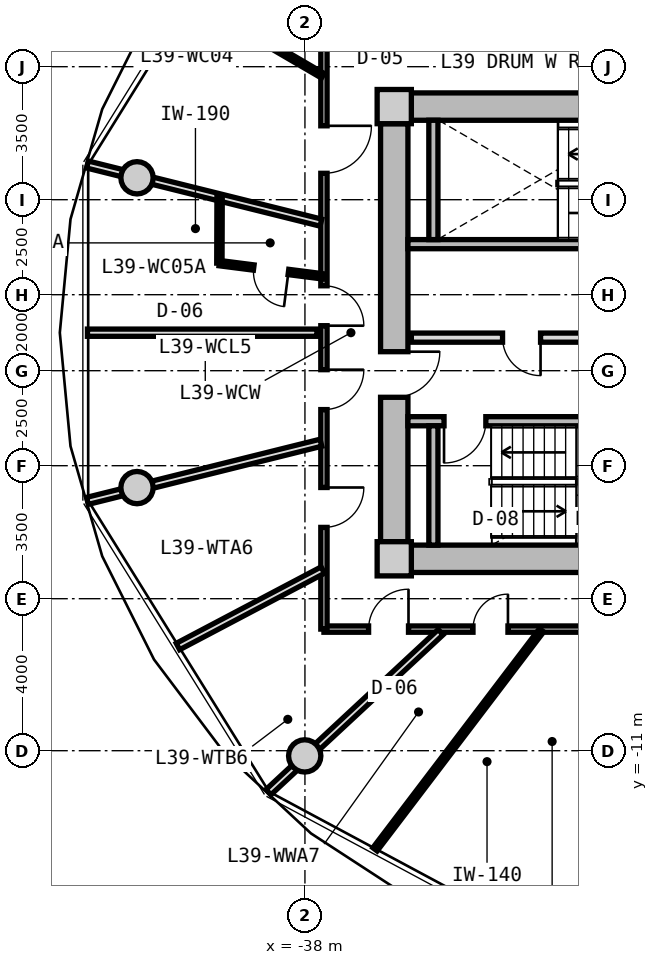
"""IFC4 building model, lengths in metres.
Left out: names, types, materials, properties, quantities, classifications, styles, units other than length and angle.
Written with IfcOpenShell. Run it as: python <this file> out.ifc"""

import sys

from ifc_helpers import new_model, si_unit, direction, frame, frame_2d, origin, origin_2d, place, context, subcontext, project, spatial, rectangle, circle, extrude, source, transform, mapped, element, fill, save


model = new_model("IFC4")
c1 = context("Model", 3, precision=1e-05, world=origin(), true_north=direction((0.0, 1.0)))
c2 = subcontext(c1, "Body", "Model", "MODEL_VIEW")
j1 = project(units=[si_unit("LENGTHUNIT", "METRE"), si_unit("PLANEANGLEUNIT", "RADIAN")], contexts=[c1])
p1 = place(None, origin())
s1 = spatial("IfcSite", under=j1, at=p1, CompositionType="ELEMENT")
p2 = place(p1, origin())
s2 = spatial("IfcBuilding", under=s1, at=p2, CompositionType="ELEMENT")
p3 = place(p2, frame((0.0, 0.0, 126.75)))
s3 = spatial("IfcBuildingStorey", under=s2, at=p3, CompositionType="ELEMENT", Elevation=126.75)
m1 = source(origin(), c2, "Body", "SweptSolid", [
    extrude(rectangle(XDim=0.9, YDim=0.9, at=origin_2d()), origin(), (0.0, 0.0, 1.0), 3.05),
])
for number, where, z_axis, x_axis in (
    (1, (-35.65, -5.95, 0.0), (0.0, 0.0, 1.0), (1.0, 0.0, 0.0)),
    (2, (-35.65, 5.95, 0.0), (0.0, 0.0, 1.0), (1.0, 0.0, 0.0)),
):
    element("IfcColumn", number, at=place(p3, frame(where, z_axis=z_axis, x_axis=x_axis)), inside=s3, PredefinedType="COLUMN", context=c2, shape_type="MappedRepresentation", body=[
        mapped(m1, transform((0.0, 0.0, 0.0), x_axis=(1.0, 0.0, 0.0), y_axis=(0.0, 1.0, 0.0), z_axis=(0.0, 0.0, 1.0), scale=1.0)),
    ])
m2 = source(origin(), c2, "Body", "SweptSolid", [
    extrude(rectangle(XDim=14.4, YDim=0.72, at=frame_2d((7.2, 0.0))), origin(), (0.0, 0.0, 1.0), 2.73),
])
for number, where, z_axis, x_axis in (
    (3, (-35.2, 5.95, 0.0), (0.0, 0.0, 1.0), (1.0, 0.0, 0.0)),
    (4, (-20.8, -5.95, 0.0), (0.0, 0.0, 1.0), (-1.0, 0.0, 0.0)),
):
    element("IfcWall", number, at=place(p3, frame(where, z_axis=z_axis, x_axis=x_axis)), inside=s3, PredefinedType="SHEAR", context=c2, shape_type="MappedRepresentation", body=[
        mapped(m2, transform((0.0, 0.0, 0.0), x_axis=(1.0, 0.0, 0.0), y_axis=(0.0, 1.0, 0.0), z_axis=(0.0, 0.0, 1.0), scale=1.0)),
    ])
m3 = source(origin(), c2, "Body", "SweptSolid", [
    extrude(rectangle(XDim=11.0, YDim=0.72, at=frame_2d((5.5, 0.0))), origin(), (0.0, 0.0, 1.0), 2.73),
])
p4 = place(p3, frame((-35.65, -5.5, 0.0), z_axis=(0.0, 0.0, 1.0), x_axis=(0.0, 1.0, 0.0)))
e5 = element("IfcWall", 5, at=p4, inside=s3, PredefinedType="SHEAR", context=c2, shape_type="MappedRepresentation", body=[
    mapped(m3, transform((0.0, 0.0, 0.0), x_axis=(1.0, 0.0, 0.0), y_axis=(0.0, 1.0, 0.0), z_axis=(0.0, 0.0, 1.0), scale=1.0)),
])
p5 = place(p4, frame((3.8, 0.0, 0.0)))
e6 = element("IfcOpeningElement", 6, at=p5, cuts=e5, PredefinedType="OPENING", context=c2, shape_type="SweptSolid", body=[
    extrude(rectangle(XDim=1.2, YDim=2.15, at=frame_2d((0.6, 1.075))), frame((0.0, 0.37, 0.0), z_axis=(0.0, -1.0, 0.0), x_axis=(1.0, 0.0, 0.0)), (0.0, 0.0, 1.0), 0.74),
])
m4 = source(origin(), c2, "Body", "SweptSolid", [
    extrude(circle(Radius=0.425, at=origin_2d()), origin(), (0.0, 0.0, 1.0), 3.05),
])
for number, where, z_axis, x_axis in (
    (7, (-42.419, 4.076, 0.0), (0.0, 0.0, 1.0), (1.0, 0.0, 0.0)),
    (8, (-42.419, -4.076, 0.0), (0.0, 0.0, 1.0), (1.0, 0.0, 0.0)),
    (9, (-38.006, -11.137, 0.0), (0.0, 0.0, 1.0), (1.0, 0.0, 0.0)),
):
    element("IfcColumn", number, at=place(p3, frame(where, z_axis=z_axis, x_axis=x_axis)), inside=s3, PredefinedType="COLUMN", context=c2, shape_type="MappedRepresentation", body=[
        mapped(m4, transform((0.0, 0.0, 0.0), x_axis=(1.0, 0.0, 0.0), y_axis=(0.0, 1.0, 0.0), z_axis=(0.0, 0.0, 1.0), scale=1.0)),
    ])
m5 = source(origin(), c2, "Body", "SweptSolid", [
    extrude(rectangle(XDim=7.83, YDim=0.24, at=frame_2d((3.915, 0.0))), origin(), (0.0, 0.0, 1.0), 2.73),
])
p6 = place(p3, frame((-35.29, 2.33, 0.0), z_axis=(0.0, 0.0, 1.0), x_axis=(1.0, 0.0, 0.0)))
e10 = element("IfcWall", 10, at=p6, inside=s3, PredefinedType="PARTITIONING", context=c2, shape_type="MappedRepresentation", body=[
    mapped(m5, transform((0.0, 0.0, 0.0), x_axis=(1.0, 0.0, 0.0), y_axis=(0.0, 1.0, 0.0), z_axis=(0.0, 0.0, 1.0), scale=1.0)),
])
m6 = source(origin(), c2, "Body", "SweptSolid", [
    extrude(rectangle(XDim=3.14, YDim=0.24, at=frame_2d((1.57, 0.0))), origin(), (0.0, 0.0, 1.0), 2.73),
])
p7 = place(p3, frame((-34.62, 2.45, 0.0), z_axis=(0.0, 0.0, 1.0), x_axis=(0.0, 1.0, 0.0)))
e11 = element("IfcWall", 11, at=p7, inside=s3, PredefinedType="PARTITIONING", context=c2, shape_type="MappedRepresentation", body=[
    mapped(m6, transform((0.0, 0.0, 0.0), x_axis=(1.0, 0.0, 0.0), y_axis=(0.0, 1.0, 0.0), z_axis=(0.0, 0.0, 1.0), scale=1.0)),
])
p8 = place(p3, frame((-35.29, -2.33, 0.0), z_axis=(0.0, 0.0, 1.0), x_axis=(1.0, 0.0, 0.0)))
e12 = element("IfcWall", 12, at=p8, inside=s3, PredefinedType="PARTITIONING", context=c2, shape_type="MappedRepresentation", body=[
    mapped(m5, transform((0.0, 0.0, 0.0), x_axis=(1.0, 0.0, 0.0), y_axis=(0.0, 1.0, 0.0), z_axis=(0.0, 0.0, 1.0), scale=1.0)),
])
p9 = place(p8, frame((0.95, 0.0, 0.0)))
e13 = element("IfcOpeningElement", 13, at=p9, cuts=e12, PredefinedType="OPENING", context=c2, shape_type="SweptSolid", body=[
    extrude(rectangle(XDim=1.1, YDim=2.15, at=frame_2d((0.55, 1.075))), frame((0.0, 0.13, 0.0), z_axis=(0.0, -1.0, 0.0), x_axis=(1.0, 0.0, 0.0)), (0.0, 0.0, 1.0), 0.26),
])
p10 = place(p3, frame((-34.62, -5.59, 0.0), z_axis=(0.0, 0.0, 1.0), x_axis=(0.0, 1.0, 0.0)))
e14 = element("IfcWall", 14, at=p10, inside=s3, PredefinedType="PARTITIONING", context=c2, shape_type="MappedRepresentation", body=[
    mapped(m6, transform((0.0, 0.0, 0.0), x_axis=(1.0, 0.0, 0.0), y_axis=(0.0, 1.0, 0.0), z_axis=(0.0, 0.0, 1.0), scale=1.0)),
])
m7 = source(origin(), c2, "Body", "SweptSolid", [
    extrude(rectangle(XDim=7.62, YDim=0.24, at=frame_2d((3.81, 0.0))), origin(), (0.0, 0.0, 1.0), 2.715),
])
p11 = place(p3, frame((-35.2, -0.13, 0.0), z_axis=(0.0, 0.0, 1.0), x_axis=(1.0, 0.0, 0.0)))
e15 = element("IfcWall", 15, at=p11, inside=s3, PredefinedType="PARTITIONING", context=c2, shape_type="MappedRepresentation", body=[
    mapped(m7, transform((0.0, 0.0, 0.0), x_axis=(1.0, 0.0, 0.0), y_axis=(0.0, 1.0, 0.0), z_axis=(0.0, 0.0, 1.0), scale=1.0)),
])
p12 = place(p11, frame((6.22, 0.0, 0.0)))
e16 = element("IfcOpeningElement", 16, at=p12, cuts=e15, PredefinedType="OPENING", context=c2, shape_type="SweptSolid", body=[
    extrude(rectangle(XDim=1.0, YDim=2.1, at=frame_2d((0.5, 1.05))), frame((0.0, 0.13, 0.0), z_axis=(0.0, -1.0, 0.0), x_axis=(1.0, 0.0, 0.0)), (0.0, 0.0, 1.0), 0.26),
])
p13 = place(p11, frame((2.4, 0.0, 0.0)))
e17 = element("IfcOpeningElement", 17, at=p13, cuts=e15, PredefinedType="OPENING", context=c2, shape_type="SweptSolid", body=[
    extrude(rectangle(XDim=1.0, YDim=2.1, at=frame_2d((0.5, 1.05))), frame((0.0, 0.13, 0.0), z_axis=(0.0, -1.0, 0.0), x_axis=(1.0, 0.0, 0.0)), (0.0, 0.0, 1.0), 0.26),
])
m8 = source(origin(), c2, "Body", "SweptSolid", [
    extrude(rectangle(XDim=9.234, YDim=0.165, at=frame_2d((4.617, 0.0))), origin(), (0.0, 0.0, 1.0), 2.715),
])
p14 = place(p3, frame((-28.266, -7.8, 0.0), z_axis=(0.0, 0.0, 1.0), x_axis=(-1.0, 0.0, 0.0)))
e18 = element("IfcWall", 18, at=p14, inside=s3, PredefinedType="PARTITIONING", context=c2, shape_type="MappedRepresentation", body=[
    mapped(m8, transform((0.0, 0.0, 0.0), x_axis=(1.0, 0.0, 0.0), y_axis=(0.0, 1.0, 0.0), z_axis=(0.0, 0.0, 1.0), scale=1.0)),
])
p15 = place(p14, frame((7.009, 0.0, 0.0)))
e19 = element("IfcOpeningElement", 19, at=p15, cuts=e18, PredefinedType="OPENING", context=c2, shape_type="SweptSolid", body=[
    extrude(rectangle(XDim=1.05, YDim=2.15, at=frame_2d((0.525, 1.075))), frame((0.0, 0.093, 0.0), z_axis=(0.0, -1.0, 0.0), x_axis=(1.0, 0.0, 0.0)), (0.0, 0.0, 1.0), 0.185),
])
p16 = place(p14, frame((4.392, 0.0, 0.0)))
e20 = element("IfcOpeningElement", 20, at=p16, cuts=e18, PredefinedType="OPENING", context=c2, shape_type="SweptSolid", body=[
    extrude(rectangle(XDim=0.92, YDim=2.1, at=frame_2d((0.46, 1.05))), frame((0.0, 0.093, 0.0), z_axis=(0.0, -1.0, 0.0), x_axis=(1.0, 0.0, 0.0)), (0.0, 0.0, 1.0), 0.185),
])
p17 = place(p14, frame((1.408, 0.0, 0.0)))
e21 = element("IfcOpeningElement", 21, at=p17, cuts=e18, PredefinedType="OPENING", context=c2, shape_type="SweptSolid", body=[
    extrude(rectangle(XDim=0.92, YDim=2.1, at=frame_2d((0.46, 1.05))), frame((0.0, 0.093, 0.0), z_axis=(0.0, -1.0, 0.0), x_axis=(1.0, 0.0, 0.0)), (0.0, 0.0, 1.0), 0.185),
])
m9 = source(origin(), c2, "Body", "SweptSolid", [
    extrude(rectangle(XDim=15.6, YDim=0.165, at=frame_2d((7.8, 0.0))), origin(), (0.0, 0.0, 1.0), 2.715),
])
p18 = place(p3, frame((-37.5, -7.8, 0.0), z_axis=(0.0, 0.0, 1.0), x_axis=(0.0, 1.0, 0.0)))
e22 = element("IfcWall", 22, at=p18, inside=s3, PredefinedType="PARTITIONING", context=c2, shape_type="MappedRepresentation", body=[
    mapped(m9, transform((0.0, 0.0, 0.0), x_axis=(1.0, 0.0, 0.0), y_axis=(0.0, 1.0, 0.0), z_axis=(0.0, 0.0, 1.0), scale=1.0)),
])
p19 = place(p18, frame((11.994, 0.0, 0.0)))
e23 = element("IfcOpeningElement", 23, at=p19, cuts=e22, PredefinedType="OPENING", context=c2, shape_type="SweptSolid", body=[
    extrude(rectangle(XDim=1.25, YDim=2.2, at=frame_2d((0.625, 1.1))), frame((0.0, 0.093, 0.0), z_axis=(0.0, -1.0, 0.0), x_axis=(1.0, 0.0, 0.0)), (0.0, 0.0, 1.0), 0.185),
])
p20 = place(p18, frame((7.984, 0.0, 0.0)))
e24 = element("IfcOpeningElement", 24, at=p20, cuts=e22, PredefinedType="OPENING", context=c2, shape_type="SweptSolid", body=[
    extrude(rectangle(XDim=1.05, YDim=2.15, at=frame_2d((0.525, 1.075))), frame((0.0, 0.093, 0.0), z_axis=(0.0, -1.0, 0.0), x_axis=(1.0, 0.0, 0.0)), (0.0, 0.0, 1.0), 0.185),
])
p21 = place(p18, frame((5.777, 0.0, 0.0)))
e25 = element("IfcOpeningElement", 25, at=p21, cuts=e22, PredefinedType="OPENING", context=c2, shape_type="SweptSolid", body=[
    extrude(rectangle(XDim=1.05, YDim=2.15, at=frame_2d((0.525, 1.075))), frame((0.0, 0.093, 0.0), z_axis=(0.0, -1.0, 0.0), x_axis=(1.0, 0.0, 0.0)), (0.0, 0.0, 1.0), 0.185),
])
p22 = place(p18, frame((2.676, 0.0, 0.0)))
e26 = element("IfcOpeningElement", 26, at=p22, cuts=e22, PredefinedType="OPENING", context=c2, shape_type="SweptSolid", body=[
    extrude(rectangle(XDim=1.05, YDim=2.15, at=frame_2d((0.525, 1.075))), frame((0.0, 0.093, 0.0), z_axis=(0.0, -1.0, 0.0), x_axis=(1.0, 0.0, 0.0)), (0.0, 0.0, 1.0), 0.185),
])
m10 = source(origin(), c2, "Body", "SweptSolid", [
    extrude(rectangle(XDim=6.331, YDim=0.19, at=frame_2d((3.165, 0.0))), origin(), (0.0, 0.0, 1.0), 2.215),
])
p23 = place(p3, frame((-37.58, 2.896, 0.0), z_axis=(0.0, 0.0, 1.0), x_axis=(-0.97036440661, 0.241646267062, 0.0)))
e27 = element("IfcWall", 27, at=p23, inside=s3, PredefinedType="PARTITIONING", context=c2, shape_type="MappedRepresentation", body=[
    mapped(m10, transform((0.0, 0.0, 0.0), x_axis=(1.0, 0.0, 0.0), y_axis=(0.0, 1.0, 0.0), z_axis=(0.0, 0.0, 1.0), scale=1.0)),
])
m11 = source(origin(), c2, "Body", "SweptSolid", [
    extrude(rectangle(XDim=2.172, YDim=0.14, at=frame_2d((1.086, 0.0))), origin(), (0.0, 0.0, 1.0), 2.715),
])
p24 = place(p3, frame((-37.53, 6.762, 0.0), z_axis=(0.0, 0.0, 1.0), x_axis=(-0.863562702562, 0.504241468688, 0.0)))
e28 = element("IfcWall", 28, at=p24, inside=s3, PredefinedType="PARTITIONING", context=c2, shape_type="MappedRepresentation", body=[
    mapped(m11, transform((0.0, 0.0, 0.0), x_axis=(1.0, 0.0, 0.0), y_axis=(0.0, 1.0, 0.0), z_axis=(0.0, 0.0, 1.0), scale=1.0)),
])
p25 = place(p3, frame((-37.58, -2.896, 0.0), z_axis=(0.0, 0.0, 1.0), x_axis=(-0.97036440661, -0.241646267062, 0.0)))
e29 = element("IfcWall", 29, at=p25, inside=s3, PredefinedType="PARTITIONING", context=c2, shape_type="MappedRepresentation", body=[
    mapped(m10, transform((0.0, 0.0, 0.0), x_axis=(1.0, 0.0, 0.0), y_axis=(0.0, 1.0, 0.0), z_axis=(0.0, 0.0, 1.0), scale=1.0)),
])
m12 = source(origin(), c2, "Body", "SweptSolid", [
    extrude(rectangle(XDim=6.039, YDim=0.19, at=frame_2d((3.019, 0.0))), origin(), (0.0, 0.0, 1.0), 2.715),
])
p26 = place(p3, frame((-37.685, 0.0, 0.0), z_axis=(0.0, 0.0, 1.0), x_axis=(-1.0, 0.0, 0.0)))
e30 = element("IfcWall", 30, at=p26, inside=s3, PredefinedType="PARTITIONING", context=c2, shape_type="MappedRepresentation", body=[
    mapped(m12, transform((0.0, 0.0, 0.0), x_axis=(1.0, 0.0, 0.0), y_axis=(0.0, 1.0, 0.0), z_axis=(0.0, 0.0, 1.0), scale=1.0)),
])
m13 = source(origin(), c2, "Body", "SweptSolid", [
    extrude(rectangle(XDim=2.744, YDim=0.14, at=frame_2d((1.372, 0.0))), origin(), (0.0, 0.0, 1.0), 2.715),
])
p27 = place(p3, frame((-37.53, 1.482, 0.0), z_axis=(0.0, 0.0, 1.0), x_axis=(-0.991916450239, 0.126892693823, 0.0)))
e31 = element("IfcWall", 31, at=p27, inside=s3, PredefinedType="PARTITIONING", context=c2, shape_type="MappedRepresentation", body=[
    mapped(m13, transform((0.0, 0.0, 0.0), x_axis=(1.0, 0.0, 0.0), y_axis=(0.0, 1.0, 0.0), z_axis=(0.0, 0.0, 1.0), scale=1.0)),
])
p28 = place(p27, frame((0.912, 0.0, 0.0)))
e32 = element("IfcOpeningElement", 32, at=p28, cuts=e31, PredefinedType="OPENING", context=c2, shape_type="SweptSolid", body=[
    extrude(rectangle(XDim=0.92, YDim=2.1, at=frame_2d((0.46, 1.05))), frame((0.0, 0.08, 0.0), z_axis=(0.0, -1.0, 0.0), x_axis=(1.0, 0.0, 0.0)), (0.0, 0.0, 1.0), 0.16),
])
m14 = source(origin(), c2, "Body", "SweptSolid", [
    extrude(rectangle(XDim=1.749, YDim=0.14, at=frame_2d((0.875, 0.0))), origin(), (0.0, 0.0, 1.0), 2.715),
])
p29 = place(p3, frame((-40.251, 1.831, 0.0), z_axis=(0.0, 0.0, 1.0), x_axis=(0.003350064953, 0.999994388517, 0.0)))
e33 = element("IfcWall", 33, at=p29, inside=s3, PredefinedType="PARTITIONING", context=c2, shape_type="MappedRepresentation", body=[
    mapped(m14, transform((0.0, 0.0, 0.0), x_axis=(1.0, 0.0, 0.0), y_axis=(0.0, 1.0, 0.0), z_axis=(0.0, 0.0, 1.0), scale=1.0)),
])
m15 = source(origin(), c2, "Body", "SweptSolid", [
    extrude(rectangle(XDim=6.187, YDim=0.19, at=frame_2d((3.093, 0.0))), origin(), (0.0, 0.0, 1.0), 2.215),
])
p30 = place(p3, frame((-34.429, -7.88, 0.0), z_axis=(0.0, 0.0, 1.0), x_axis=(-0.732501077882, -0.680765870841, 0.0)))
e34 = element("IfcWall", 34, at=p30, inside=s3, PredefinedType="PARTITIONING", context=c2, shape_type="MappedRepresentation", body=[
    mapped(m15, transform((0.0, 0.0, 0.0), x_axis=(1.0, 0.0, 0.0), y_axis=(0.0, 1.0, 0.0), z_axis=(0.0, 0.0, 1.0), scale=1.0)),
])
m16 = source(origin(), c2, "Body", "SweptSolid", [
    extrude(rectangle(XDim=4.31, YDim=0.19, at=frame_2d((2.155, 0.0))), origin(), (0.0, 0.0, 1.0), 2.715),
])
p31 = place(p3, frame((-37.53, -6.248, 0.0), z_axis=(0.0, 0.0, 1.0), x_axis=(-0.884459441503, -0.466617076773, 0.0)))
e35 = element("IfcWall", 35, at=p31, inside=s3, PredefinedType="PARTITIONING", context=c2, shape_type="MappedRepresentation", body=[
    mapped(m16, transform((0.0, 0.0, 0.0), x_axis=(1.0, 0.0, 0.0), y_axis=(0.0, 1.0, 0.0), z_axis=(0.0, 0.0, 1.0), scale=1.0)),
])
m17 = source(origin(), c2, "Body", "SweptSolid", [
    extrude(rectangle(XDim=7.243, YDim=0.14, at=frame_2d((3.621, 0.0))), origin(), (0.0, 0.0, 1.0), 2.715),
])
p32 = place(p3, frame((-31.774, -7.83, 0.0), z_axis=(0.0, 0.0, 1.0), x_axis=(-0.605111472002, -0.796140757939, 0.0)))
e36 = element("IfcWall", 36, at=p32, inside=s3, PredefinedType="PARTITIONING", context=c2, shape_type="MappedRepresentation", body=[
    mapped(m17, transform((0.0, 0.0, 0.0), x_axis=(1.0, 0.0, 0.0), y_axis=(0.0, 1.0, 0.0), z_axis=(0.0, 0.0, 1.0), scale=1.0)),
])
m18 = source(origin(), c2, "Body", "SweptSolid", [
    extrude(rectangle(XDim=1.1, YDim=2.15, at=frame_2d((0.55, 1.075))), frame((0.0, 0.025, 0.0), z_axis=(0.0, -1.0, 0.0), x_axis=(1.0, 0.0, 0.0)), (0.0, 0.0, 1.0), 0.05),
])
p33 = place(p9, frame((1.1, 0.0, 0.0), z_axis=(0.0, 0.0, 1.0), x_axis=(-1.0, 0.0, 0.0)))
e37 = element("IfcDoor", 37, at=p33, inside=s3, OperationType="SINGLE_SWING_RIGHT", PredefinedType="DOOR", context=c2, shape_type="MappedRepresentation", body=[
    mapped(m18, transform((0.0, 0.0, 0.0), x_axis=(1.0, 0.0, 0.0), y_axis=(0.0, 1.0, 0.0), z_axis=(0.0, 0.0, 1.0), scale=1.0)),
])
fill(e13, e37)
m19 = source(origin(), c2, "Body", "SweptSolid", [
    extrude(rectangle(XDim=1.2, YDim=2.15, at=frame_2d((0.6, 1.075))), frame((0.0, 0.025, 0.0), z_axis=(0.0, -1.0, 0.0), x_axis=(1.0, 0.0, 0.0)), (0.0, 0.0, 1.0), 0.05),
])
p34 = place(p5, frame((1.2, 0.0, 0.0), z_axis=(0.0, 0.0, 1.0), x_axis=(-1.0, 0.0, 0.0)))
e38 = element("IfcDoor", 38, at=p34, inside=s3, OperationType="SINGLE_SWING_LEFT", PredefinedType="DOOR", context=c2, shape_type="MappedRepresentation", body=[
    mapped(m19, transform((0.0, 0.0, 0.0), x_axis=(1.0, 0.0, 0.0), y_axis=(0.0, 1.0, 0.0), z_axis=(0.0, 0.0, 1.0), scale=1.0)),
])
fill(e6, e38)
m20 = source(origin(), c2, "Body", "SweptSolid", [
    extrude(rectangle(XDim=1.0, YDim=2.1, at=frame_2d((0.5, 1.05))), frame((0.0, 0.025, 0.0), z_axis=(0.0, -1.0, 0.0), x_axis=(1.0, 0.0, 0.0)), (0.0, 0.0, 1.0), 0.05),
])
p35 = place(p13, frame((1.0, 0.0, 0.0), z_axis=(0.0, 0.0, 1.0), x_axis=(-1.0, 0.0, 0.0)))
e39 = element("IfcDoor", 39, at=p35, inside=s3, OperationType="SINGLE_SWING_LEFT", PredefinedType="DOOR", context=c2, shape_type="MappedRepresentation", body=[
    mapped(m20, transform((0.0, 0.0, 0.0), x_axis=(1.0, 0.0, 0.0), y_axis=(0.0, 1.0, 0.0), z_axis=(0.0, 0.0, 1.0), scale=1.0)),
])
fill(e17, e39)
m21 = source(origin(), c2, "Body", "SweptSolid", [
    extrude(rectangle(XDim=1.25, YDim=2.2, at=frame_2d((0.625, 1.1))), frame((0.0, 0.025, 0.0), z_axis=(0.0, -1.0, 0.0), x_axis=(1.0, 0.0, 0.0)), (0.0, 0.0, 1.0), 0.05),
])
p36 = place(p19, frame((1.25, 0.0, 0.0), z_axis=(0.0, 0.0, 1.0), x_axis=(-1.0, 0.0, 0.0)))
e40 = element("IfcDoor", 40, at=p36, inside=s3, OperationType="SINGLE_SWING_LEFT", PredefinedType="DOOR", context=c2, shape_type="MappedRepresentation", body=[
    mapped(m21, transform((0.0, 0.0, 0.0), x_axis=(1.0, 0.0, 0.0), y_axis=(0.0, 1.0, 0.0), z_axis=(0.0, 0.0, 1.0), scale=1.0)),
])
fill(e23, e40)
m22 = source(origin(), c2, "Body", "SweptSolid", [
    extrude(rectangle(XDim=1.05, YDim=2.15, at=frame_2d((0.525, 1.075))), frame((0.0, 0.025, 0.0), z_axis=(0.0, -1.0, 0.0), x_axis=(1.0, 0.0, 0.0)), (0.0, 0.0, 1.0), 0.05),
])
p37 = place(p20, frame((1.05, 0.0, 0.0), z_axis=(0.0, 0.0, 1.0), x_axis=(-1.0, 0.0, 0.0)))
e41 = element("IfcDoor", 41, at=p37, inside=s3, OperationType="SINGLE_SWING_RIGHT", PredefinedType="DOOR", context=c2, shape_type="MappedRepresentation", body=[
    mapped(m22, transform((0.0, 0.0, 0.0), x_axis=(1.0, 0.0, 0.0), y_axis=(0.0, 1.0, 0.0), z_axis=(0.0, 0.0, 1.0), scale=1.0)),
])
fill(e24, e41)
m23 = source(origin(), c2, "Body", "SweptSolid", [
    extrude(rectangle(XDim=0.92, YDim=2.1, at=frame_2d((0.46, 1.05))), frame((0.0, 0.025, 0.0), z_axis=(0.0, -1.0, 0.0), x_axis=(1.0, 0.0, 0.0)), (0.0, 0.0, 1.0), 0.05),
])
p38 = place(p28, origin())
e42 = element("IfcDoor", 42, at=p38, inside=s3, OperationType="SINGLE_SWING_LEFT", PredefinedType="DOOR", context=c2, shape_type="MappedRepresentation", body=[
    mapped(m23, transform((0.0, 0.0, 0.0), x_axis=(1.0, 0.0, 0.0), y_axis=(0.0, 1.0, 0.0), z_axis=(0.0, 0.0, 1.0), scale=1.0)),
])
fill(e32, e42)
p39 = place(p21, frame((1.05, 0.0, 0.0), z_axis=(0.0, 0.0, 1.0), x_axis=(-1.0, 0.0, 0.0)))
e43 = element("IfcDoor", 43, at=p39, inside=s3, OperationType="SINGLE_SWING_LEFT", PredefinedType="DOOR", context=c2, shape_type="MappedRepresentation", body=[
    mapped(m22, transform((0.0, 0.0, 0.0), x_axis=(1.0, 0.0, 0.0), y_axis=(0.0, 1.0, 0.0), z_axis=(0.0, 0.0, 1.0), scale=1.0)),
])
fill(e25, e43)
p40 = place(p22, frame((1.05, 0.0, 0.0), z_axis=(0.0, 0.0, 1.0), x_axis=(-1.0, 0.0, 0.0)))
e44 = element("IfcDoor", 44, at=p40, inside=s3, OperationType="SINGLE_SWING_LEFT", PredefinedType="DOOR", context=c2, shape_type="MappedRepresentation", body=[
    mapped(m22, transform((0.0, 0.0, 0.0), x_axis=(1.0, 0.0, 0.0), y_axis=(0.0, 1.0, 0.0), z_axis=(0.0, 0.0, 1.0), scale=1.0)),
])
fill(e26, e44)
p41 = place(p15, frame((1.05, 0.0, 0.0), z_axis=(0.0, 0.0, 1.0), x_axis=(-1.0, 0.0, 0.0)))
e45 = element("IfcDoor", 45, at=p41, inside=s3, OperationType="SINGLE_SWING_RIGHT", PredefinedType="DOOR", context=c2, shape_type="MappedRepresentation", body=[
    mapped(m22, transform((0.0, 0.0, 0.0), x_axis=(1.0, 0.0, 0.0), y_axis=(0.0, 1.0, 0.0), z_axis=(0.0, 0.0, 1.0), scale=1.0)),
])
fill(e19, e45)
p42 = place(p16, frame((0.92, 0.0, 0.0), z_axis=(0.0, 0.0, 1.0), x_axis=(-1.0, 0.0, 0.0)))
e46 = element("IfcDoor", 46, at=p42, inside=s3, OperationType="SINGLE_SWING_RIGHT", PredefinedType="DOOR", context=c2, shape_type="MappedRepresentation", body=[
    mapped(m23, transform((0.0, 0.0, 0.0), x_axis=(1.0, 0.0, 0.0), y_axis=(0.0, 1.0, 0.0), z_axis=(0.0, 0.0, 1.0), scale=1.0)),
])
fill(e20, e46)
save(model, sys.argv[1])
